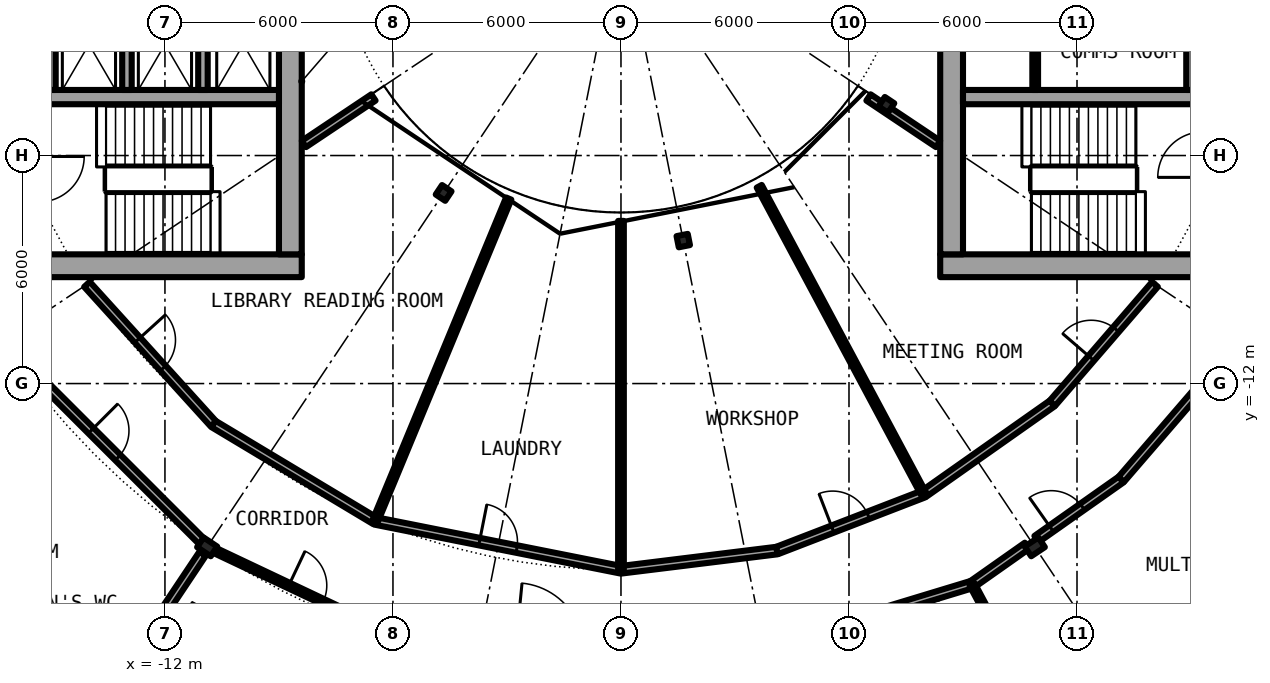
"""IFC4 building model, lengths in metres.
Left out: names, types, materials, properties, quantities, classifications, styles, units other than length and angle.
Written with IfcOpenShell. Run it as: python <this file> out.ifc"""

import sys

from ifc_helpers import new_model, si_unit, direction, frame, frame_2d, origin, origin_2d, place, context, subcontext, project, spatial, rectangle, i_section, extrude, element, fill, save


model = new_model("IFC4")
c1 = context("Model", 3, precision=1e-05, world=origin(), true_north=direction((0.0, 1.0)))
c2 = subcontext(c1, "Body", "Model", "MODEL_VIEW")
j1 = project(units=[si_unit("LENGTHUNIT", "METRE"), si_unit("PLANEANGLEUNIT", "RADIAN")], contexts=[c1])
p1 = place(None, origin())
s1 = spatial("IfcSite", under=j1, at=p1, CompositionType="ELEMENT")
p2 = place(p1, origin())
s2 = spatial("IfcBuilding", under=s1, at=p2, CompositionType="ELEMENT")
p3 = place(p2, frame((0.0, 0.0, 107.45)))
s3 = spatial("IfcBuildingStorey", under=s2, at=p3, CompositionType="ELEMENT", Elevation=107.45)
for number, where, z_axis, x_axis in (
    (1, (-10.889, -16.297, 0.0), (0.0, 0.0, 1.0), (-0.556, -0.831, 0.0)),
    (2, (10.889, -16.297, 0.0), (0.0, 0.0, 1.0), (0.556, -0.831, 0.0)),
):
    element("IfcColumn", number, at=place(p3, frame(where, z_axis=z_axis, x_axis=x_axis)), inside=s3, PredefinedType="COLUMN", context=c2, shape_type="SweptSolid", body=[
        extrude(i_section(OverallWidth=0.307, OverallDepth=0.432, WebThickness=0.021, FlangeThickness=0.04, FilletRadius=0.027, at=origin_2d()), origin(), (0.0, 0.0, 1.0), 4.2),
    ])
for number, where, z_axis, x_axis in (
    (3, (-4.667, -6.984, 0.0), (0.0, 0.0, 1.0), (-0.556, -0.831, 0.0)),
    (4, (1.639, -8.239, 0.0), (0.0, 0.0, 1.0), (0.195, -0.981, 0.0)),
    (5, (6.984, -4.667, 0.0), (0.0, 0.0, 1.0), (0.831, -0.556, 0.0)),
):
    element("IfcColumn", number, at=place(p3, frame(where, z_axis=z_axis, x_axis=x_axis)), inside=s3, PredefinedType="COLUMN", context=c2, shape_type="SweptSolid", body=[
        extrude(i_section(OverallWidth=0.3, OverallDepth=0.3, WebThickness=0.011, FlangeThickness=0.019, FilletRadius=0.027, at=origin_2d()), origin(), (0.0, 0.0, 1.0), 4.2),
    ])
p4 = place(p3, frame((8.4, -8.9, 0.0), z_axis=(0.0, 0.0, 1.0), x_axis=(1.0, 0.0, 0.0)))
e6 = element("IfcWall", 6, at=p4, inside=s3, PredefinedType="SHEAR", context=c2, shape_type="SweptSolid", body=[
    extrude(rectangle(XDim=13.8, YDim=0.6, at=frame_2d((6.9, 0.0))), origin(), (0.0, 0.0, 1.0), 4.2),
])
p5 = place(p4, frame((11.475, 0.0, 0.0)))
e7 = element("IfcOpeningElement", 7, at=p5, cuts=e6, PredefinedType="OPENING", context=c2, shape_type="SweptSolid", body=[
    extrude(rectangle(XDim=1.2, YDim=2.3, at=frame_2d((0.6, 1.15))), frame((0.0, 0.31, 0.0), z_axis=(0.0, -1.0, 0.0), x_axis=(1.0, 0.0, 0.0)), (0.0, 0.0, 1.0), 0.62),
])
p6 = place(p3, frame((8.7, -8.6, 0.0), z_axis=(0.0, 0.0, 1.0), x_axis=(0.0, 1.0, 0.0)))
e8 = element("IfcWall", 8, at=p6, inside=s3, PredefinedType="SHEAR", context=c2, shape_type="SweptSolid", body=[
    extrude(rectangle(XDim=17.2, YDim=0.6, at=frame_2d((8.6, 0.0))), origin(), (0.0, 0.0, 1.0), 4.2),
])
p7 = place(p6, frame((7.4, 0.0, 0.1)))
e9 = element("IfcOpeningElement", 9, at=p7, cuts=e8, PredefinedType="OPENING", context=c2, shape_type="SweptSolid", body=[
    extrude(rectangle(XDim=2.4, YDim=2.2, at=frame_2d((1.2, 1.1))), frame((0.0, 0.31, 0.0), z_axis=(0.0, -1.0, 0.0), x_axis=(1.0, 0.0, 0.0)), (0.0, 0.0, 1.0), 0.62),
])
p8 = place(p3, frame((9.0, -4.462, 0.0), z_axis=(0.0, 0.0, 1.0), x_axis=(1.0, 0.0, 0.0)))
e10 = element("IfcWall", 10, at=p8, inside=s3, PredefinedType="SHEAR", context=c2, shape_type="SweptSolid", body=[
    extrude(rectangle(XDim=10.15, YDim=0.375, at=frame_2d((5.075, 0.0))), origin(), (0.0, 0.0, 1.0), 4.2),
])
p9 = place(p3, frame((15.0, -1.825, 0.0), z_axis=(0.0, 0.0, 1.0), x_axis=(0.0, -1.0, 0.0)))
e11 = element("IfcWall", 11, at=p9, inside=s3, PredefinedType="SOLIDWALL", context=c2, shape_type="SweptSolid", body=[
    extrude(rectangle(XDim=2.45, YDim=0.25, at=frame_2d((1.225, 0.0))), origin(), (0.0, 0.0, 1.0), 3.85),
])
p10 = place(p3, frame((10.9, -1.825, 0.0), z_axis=(0.0, 0.0, 1.0), x_axis=(0.0, -1.0, 0.0)))
e12 = element("IfcWall", 12, at=p10, inside=s3, PredefinedType="PARTITIONING", context=c2, shape_type="SweptSolid", body=[
    extrude(rectangle(XDim=2.45, YDim=0.15, at=frame_2d((1.225, 0.0))), origin(), (0.0, 0.0, 1.0), 3.85),
])
p11 = place(p3, frame((-22.2, -8.9, 0.0), z_axis=(0.0, 0.0, 1.0), x_axis=(1.0, 0.0, 0.0)))
e13 = element("IfcWall", 13, at=p11, inside=s3, PredefinedType="SHEAR", context=c2, shape_type="SweptSolid", body=[
    extrude(rectangle(XDim=13.8, YDim=0.6, at=frame_2d((6.9, 0.0))), origin(), (0.0, 0.0, 1.0), 4.2),
])
p12 = place(p11, frame((1.125, 0.0, 0.0)))
e14 = element("IfcOpeningElement", 14, at=p12, cuts=e13, PredefinedType="OPENING", context=c2, shape_type="SweptSolid", body=[
    extrude(rectangle(XDim=1.2, YDim=2.3, at=frame_2d((0.6, 1.15))), frame((0.0, 0.31, 0.0), z_axis=(0.0, -1.0, 0.0), x_axis=(1.0, 0.0, 0.0)), (0.0, 0.0, 1.0), 0.62),
])
p13 = place(p3, frame((-8.7, 8.6, 0.0), z_axis=(0.0, 0.0, 1.0), x_axis=(0.0, -1.0, 0.0)))
e15 = element("IfcWall", 15, at=p13, inside=s3, PredefinedType="SHEAR", context=c2, shape_type="SweptSolid", body=[
    extrude(rectangle(XDim=17.2, YDim=0.6, at=frame_2d((8.6, 0.0))), origin(), (0.0, 0.0, 1.0), 4.2),
])
p14 = place(p13, frame((7.4, 0.0, 0.1)))
e16 = element("IfcOpeningElement", 16, at=p14, cuts=e15, PredefinedType="OPENING", context=c2, shape_type="SweptSolid", body=[
    extrude(rectangle(XDim=2.4, YDim=2.2, at=frame_2d((1.2, 1.1))), frame((0.0, 0.31, 0.0), z_axis=(0.0, -1.0, 0.0), x_axis=(1.0, 0.0, 0.0)), (0.0, 0.0, 1.0), 0.62),
])
p15 = place(p3, frame((-9.0, -4.462, 0.0), z_axis=(0.0, 0.0, 1.0), x_axis=(-1.0, 0.0, 0.0)))
e17 = element("IfcWall", 17, at=p15, inside=s3, PredefinedType="SHEAR", context=c2, shape_type="SweptSolid", body=[
    extrude(rectangle(XDim=10.15, YDim=0.375, at=frame_2d((5.075, 0.0))), origin(), (0.0, 0.0, 1.0), 4.2),
])
p16 = place(p15, frame((6.6, 0.0, 0.0)))
e18 = element("IfcOpeningElement", 18, at=p16, cuts=e17, PredefinedType="OPENING", context=c2, shape_type="SweptSolid", body=[
    extrude(rectangle(XDim=1.1, YDim=2.3, at=frame_2d((0.55, 1.15))), frame((0.0, 0.198, 0.0), z_axis=(0.0, -1.0, 0.0), x_axis=(1.0, 0.0, 0.0)), (0.0, 0.0, 1.0), 0.395),
])
for number, where, z_axis, x_axis in (
    (19, (-15.0, -1.825, 0.0), (0.0, 0.0, 1.0), (0.0, -1.0, 0.0)),
    (20, (-11.0, -1.825, 0.0), (0.0, 0.0, 1.0), (0.0, -1.0, 0.0)),
    (21, (-13.0, -1.825, 0.0), (0.0, 0.0, 1.0), (0.0, -1.0, 0.0)),
):
    element("IfcWall", number, at=place(p3, frame(where, z_axis=z_axis, x_axis=x_axis)), inside=s3, PredefinedType="SOLIDWALL", context=c2, shape_type="SweptSolid", body=[
        extrude(rectangle(XDim=2.45, YDim=0.25, at=frame_2d((1.225, 0.0))), origin(), (0.0, 0.0, 1.0), 3.85),
    ])
p17 = place(p3, frame((9.239, -17.286, 0.0), z_axis=(0.0, 0.0, 1.0), x_axis=(0.817743843048, 0.575582320052, 0.0)))
e22 = element("IfcWall", 22, at=p17, inside=s3, PredefinedType="PARTITIONING", context=c2, shape_type="SweptSolid", body=[
    extrude(rectangle(XDim=1.768, YDim=0.2, at=frame_2d((0.884, 0.0))), origin(), (0.0, 0.0, 1.0), 3.54),
])
p18 = place(p3, frame((10.936, -16.091, 0.0), z_axis=(0.0, 0.0, 1.0), x_axis=(0.817645456482, 0.575722074872, 0.0)))
e23 = element("IfcWall", 23, at=p18, inside=s3, PredefinedType="PARTITIONING", context=c2, shape_type="SweptSolid", body=[
    extrude(rectangle(XDim=2.724, YDim=0.2, at=frame_2d((1.362, 0.0))), origin(), (0.0, 0.0, 1.0), 3.54),
])
p19 = place(p18, frame((0.474, 0.0, 0.0)))
e24 = element("IfcOpeningElement", 24, at=p19, cuts=e23, PredefinedType="OPENING", context=c2, shape_type="SweptSolid", body=[
    extrude(rectangle(XDim=1.0, YDim=2.3, at=frame_2d((0.5, 1.15))), frame((0.0, 0.11, 0.0), z_axis=(0.0, -1.0, 0.0), x_axis=(1.0, 0.0, 0.0)), (0.0, 0.0, 1.0), 0.22),
])
p20 = place(p3, frame((13.163, -14.523, 0.0), z_axis=(0.0, 0.0, 1.0), x_axis=(0.653087281304, 0.757282644063, 0.0)))
e25 = element("IfcWall", 25, at=p20, inside=s3, PredefinedType="PARTITIONING", context=c2, shape_type="SweptSolid", body=[
    extrude(rectangle(XDim=4.644, YDim=0.2, at=frame_2d((2.322, 0.0))), origin(), (0.0, 0.0, 1.0), 3.54),
])
p21 = place(p3, frame((-10.749, -16.363, 0.0), z_axis=(0.0, 0.0, 1.0), x_axis=(0.903968655954, -0.427598724335, 0.0)))
e26 = element("IfcWall", 26, at=p21, inside=s3, PredefinedType="PARTITIONING", context=c2, shape_type="SweptSolid", body=[
    extrude(rectangle(XDim=5.596, YDim=0.15, at=frame_2d((2.798, 0.0))), origin(), (0.0, 0.0, 1.0), 3.54),
])
p22 = place(p21, frame((2.221, 0.0, 0.0)))
e27 = element("IfcOpeningElement", 27, at=p22, cuts=e26, PredefinedType="OPENING", context=c2, shape_type="SweptSolid", body=[
    extrude(rectangle(XDim=1.0, YDim=2.3, at=frame_2d((0.5, 1.15))), frame((0.0, 0.085, 0.0), z_axis=(0.0, -1.0, 0.0), x_axis=(1.0, 0.0, 0.0)), (0.0, 0.0, 1.0), 0.17),
])
p23 = place(p3, frame((-16.186, -11.0, 0.0), z_axis=(0.0, 0.0, 1.0), x_axis=(0.707106781187, -0.707106781187, 0.0)))
e28 = element("IfcWall", 28, at=p23, inside=s3, PredefinedType="PARTITIONING", context=c2, shape_type="SweptSolid", body=[
    extrude(rectangle(XDim=7.334, YDim=0.2, at=frame_2d((3.667, 0.0))), origin(), (0.0, 0.0, 1.0), 3.54),
])
p24 = place(p23, frame((3.167, 0.0, 0.0)))
e29 = element("IfcOpeningElement", 29, at=p24, cuts=e28, PredefinedType="OPENING", context=c2, shape_type="SweptSolid", body=[
    extrude(rectangle(XDim=1.0, YDim=2.3, at=frame_2d((0.5, 1.15))), frame((0.0, 0.11, 0.0), z_axis=(0.0, -1.0, 0.0), x_axis=(1.0, 0.0, 0.0)), (0.0, 0.0, 1.0), 0.22),
])
p25 = place(p3, frame((1.921, -19.506, 0.0), z_axis=(0.0, 0.0, 1.0), x_axis=(0.956929842753, 0.290319265721, 0.0)))
e30 = element("IfcWall", 30, at=p25, inside=s3, PredefinedType="PARTITIONING", context=c2, shape_type="SweptSolid", body=[
    extrude(rectangle(XDim=7.647, YDim=0.2, at=frame_2d((3.824, 0.0))), origin(), (0.0, 0.0, 1.0), 3.54),
])
p26 = place(p3, frame((0.0, -16.9, 0.0), z_axis=(0.0, 0.0, 1.0), x_axis=(0.992496033272, 0.122276833211, 0.0)))
e31 = element("IfcWall", 31, at=p26, inside=s3, PredefinedType="PARTITIONING", context=c2, shape_type="SweptSolid", body=[
    extrude(rectangle(XDim=4.137, YDim=0.2, at=frame_2d((2.068, 0.0))), origin(), (0.0, 0.0, 1.0), 3.85),
])
p27 = place(p3, frame((4.106, -16.394, 0.0), z_axis=(0.0, 0.0, 1.0), x_axis=(0.932943640288, 0.360022449363, 0.0)))
e32 = element("IfcWall", 32, at=p27, inside=s3, PredefinedType="PARTITIONING", context=c2, shape_type="SweptSolid", body=[
    extrude(rectangle(XDim=4.139, YDim=0.2, at=frame_2d((2.069, 0.0))), origin(), (0.0, 0.0, 1.0), 3.85),
])
p28 = place(p27, frame((1.569, 0.0, 0.0)))
e33 = element("IfcOpeningElement", 33, at=p28, cuts=e32, PredefinedType="OPENING", context=c2, shape_type="SweptSolid", body=[
    extrude(rectangle(XDim=1.0, YDim=2.3, at=frame_2d((0.5, 1.15))), frame((0.0, 0.11, 0.0), z_axis=(0.0, -1.0, 0.0), x_axis=(1.0, 0.0, 0.0)), (0.0, 0.0, 1.0), 0.22),
])
p29 = place(p3, frame((7.967, -14.904, 0.0), z_axis=(0.0, 0.0, 1.0), x_axis=(0.817567680547, 0.575832517079, 0.0)))
e34 = element("IfcWall", 34, at=p29, inside=s3, PredefinedType="PARTITIONING", context=c2, shape_type="SweptSolid", body=[
    extrude(rectangle(XDim=4.137, YDim=0.2, at=frame_2d((2.068, 0.0))), origin(), (0.0, 0.0, 1.0), 3.85),
])
p30 = place(p3, frame((11.349, -12.522, 0.0), z_axis=(0.0, 0.0, 1.0), x_axis=(0.653212695939, 0.757174467256, 0.0)))
e35 = element("IfcWall", 35, at=p30, inside=s3, PredefinedType="PARTITIONING", context=c2, shape_type="SweptSolid", body=[
    extrude(rectangle(XDim=4.138, YDim=0.2, at=frame_2d((2.069, 0.0))), origin(), (0.0, 0.0, 1.0), 3.85),
])
p31 = place(p30, frame((1.569, 0.0, 0.0)))
e36 = element("IfcOpeningElement", 36, at=p31, cuts=e35, PredefinedType="OPENING", context=c2, shape_type="SweptSolid", body=[
    extrude(rectangle(XDim=1.0, YDim=2.3, at=frame_2d((0.5, 1.15))), frame((0.0, 0.11, 0.0), z_axis=(0.0, -1.0, 0.0), x_axis=(1.0, 0.0, 0.0)), (0.0, 0.0, 1.0), 0.22),
])
p32 = place(p3, frame((-14.052, -9.389, 0.0), z_axis=(0.0, 0.0, 1.0), x_axis=(0.671579385786, -0.740932607318, 0.0)))
e37 = element("IfcWall", 37, at=p32, inside=s3, PredefinedType="PARTITIONING", context=c2, shape_type="SweptSolid", body=[
    extrude(rectangle(XDim=4.96, YDim=0.2, at=frame_2d((2.48, 0.0))), origin(), (0.0, 0.0, 1.0), 3.85),
])
p33 = place(p32, frame((1.98, 0.0, 0.0)))
e38 = element("IfcOpeningElement", 38, at=p33, cuts=e37, PredefinedType="OPENING", context=c2, shape_type="SweptSolid", body=[
    extrude(rectangle(XDim=1.0, YDim=2.3, at=frame_2d((0.5, 1.15))), frame((0.0, 0.11, 0.0), z_axis=(0.0, -1.0, 0.0), x_axis=(1.0, 0.0, 0.0)), (0.0, 0.0, 1.0), 0.22),
])
p34 = place(p3, frame((-10.721, -13.064, 0.0), z_axis=(0.0, 0.0, 1.0), x_axis=(0.857696997328, -0.514155483074, 0.0)))
e39 = element("IfcWall", 39, at=p34, inside=s3, PredefinedType="PARTITIONING", context=c2, shape_type="SweptSolid", body=[
    extrude(rectangle(XDim=4.96, YDim=0.2, at=frame_2d((2.48, 0.0))), origin(), (0.0, 0.0, 1.0), 3.85),
])
p35 = place(p3, frame((-6.467, -15.614, 0.0), z_axis=(0.0, 0.0, 1.0), x_axis=(0.980799374359, -0.195019453537, 0.0)))
e40 = element("IfcWall", 40, at=p35, inside=s3, PredefinedType="PARTITIONING", context=c2, shape_type="SweptSolid", body=[
    extrude(rectangle(XDim=6.594, YDim=0.2, at=frame_2d((3.297, 0.0))), origin(), (0.0, 0.0, 1.0), 3.85),
])
p36 = place(p35, frame((2.797, 0.0, 0.0)))
e41 = element("IfcOpeningElement", 41, at=p36, cuts=e40, PredefinedType="OPENING", context=c2, shape_type="SweptSolid", body=[
    extrude(rectangle(XDim=1.0, YDim=2.3, at=frame_2d((0.5, 1.15))), frame((0.0, 0.11, 0.0), z_axis=(0.0, -1.0, 0.0), x_axis=(1.0, 0.0, 0.0)), (0.0, 0.0, 1.0), 0.22),
])
for number, where, z_axis, x_axis in (
    (42, (-6.513, -4.472, 0.0), (0.0, 0.0, 1.0), (-0.831, -0.556, 0.0)),
    (43, (6.513, -4.472, 0.0), (0.0, 0.0, 1.0), (0.831, -0.556, 0.0)),
):
    element("IfcWall", number, at=place(p3, frame(where, z_axis=z_axis, x_axis=x_axis)), inside=s3, PredefinedType="PARTITIONING", context=c2, shape_type="SweptSolid", body=[
        extrude(rectangle(XDim=2.203, YDim=0.2, at=frame_2d((1.101, 0.0))), origin(), (0.0, 0.0, 1.0), 3.85),
    ])
p37 = place(p3, frame((-12.222, -18.292, 0.0), z_axis=(0.0, 0.0, 1.0), x_axis=(0.555628995846, 0.831430345233, 0.0)))
e44 = element("IfcWall", 44, at=p37, inside=s3, PredefinedType="PARTITIONING", context=c2, shape_type="SweptSolid", body=[
    extrude(rectangle(XDim=2.183, YDim=0.2, at=frame_2d((1.091, 0.0))), origin(), (0.0, 0.0, 1.0), 3.85),
])
p38 = place(p3, frame((-6.467, -15.614, 0.0), z_axis=(0.0, 0.0, 1.0), x_axis=(0.382646942224, 0.923894646378, 0.0)))
e45 = element("IfcWall", 45, at=p38, inside=s3, PredefinedType="PARTITIONING", context=c2, shape_type="SweptSolid", body=[
    extrude(rectangle(XDim=9.181, YDim=0.15, at=frame_2d((4.59, 0.0))), origin(), (0.0, 0.0, 1.0), 3.85),
])
p39 = place(p3, frame((0.0, -16.9, 0.0), z_axis=(0.0, 0.0, 1.0), x_axis=(0.0, 1.0, 0.0)))
e46 = element("IfcWall", 46, at=p39, inside=s3, PredefinedType="PARTITIONING", context=c2, shape_type="SweptSolid", body=[
    extrude(rectangle(XDim=9.18, YDim=0.15, at=frame_2d((4.59, 0.0))), origin(), (0.0, 0.0, 1.0), 3.85),
])
p40 = place(p3, frame((3.638, -6.809, 0.0), z_axis=(0.0, 0.0, 1.0), x_axis=(0.471460365694, -0.881887251059, 0.0)))
e47 = element("IfcWall", 47, at=p40, inside=s3, PredefinedType="PARTITIONING", context=c2, shape_type="SweptSolid", body=[
    extrude(rectangle(XDim=9.18, YDim=0.15, at=frame_2d((4.59, 0.0))), origin(), (0.0, 0.0, 1.0), 3.85),
])
p41 = place(p3, frame((9.239, -17.286, 0.0), z_axis=(0.0, 0.0, 1.0), x_axis=(0.471439510802, -0.881898399848, 0.0)))
e48 = element("IfcWall", 48, at=p41, inside=s3, PredefinedType="PARTITIONING", context=c2, shape_type="SweptSolid", body=[
    extrude(rectangle(XDim=7.575, YDim=0.15, at=frame_2d((3.787, 0.0))), origin(), (0.0, 0.0, 1.0), 3.85),
])
p42 = place(p22, origin())
e49 = element("IfcDoor", 49, at=p42, inside=s3, OperationType="SINGLE_SWING_LEFT", PredefinedType="DOOR", context=c2, shape_type="SweptSolid", body=[
    extrude(rectangle(XDim=1.0, YDim=2.3, at=frame_2d((0.5, 1.15))), frame((0.0, 0.025, 0.0), z_axis=(0.0, -1.0, 0.0), x_axis=(1.0, 0.0, 0.0)), (0.0, 0.0, 1.0), 0.05),
])
fill(e27, e49)
p43 = place(p24, origin())
e50 = element("IfcDoor", 50, at=p43, inside=s3, OperationType="SINGLE_SWING_LEFT", PredefinedType="DOOR", context=c2, shape_type="SweptSolid", body=[
    extrude(rectangle(XDim=1.0, YDim=2.3, at=frame_2d((0.5, 1.15))), frame((0.0, 0.025, 0.0), z_axis=(0.0, -1.0, 0.0), x_axis=(1.0, 0.0, 0.0)), (0.0, 0.0, 1.0), 0.05),
])
fill(e29, e50)
p44 = place(p19, origin())
e51 = element("IfcDoor", 51, at=p44, inside=s3, OperationType="SINGLE_SWING_LEFT", PredefinedType="DOOR", context=c2, shape_type="SweptSolid", body=[
    extrude(rectangle(XDim=1.0, YDim=2.3, at=frame_2d((0.5, 1.15))), frame((0.0, 0.025, 0.0), z_axis=(0.0, -1.0, 0.0), x_axis=(1.0, 0.0, 0.0)), (0.0, 0.0, 1.0), 0.05),
])
fill(e24, e51)
p45 = place(p33, origin())
e52 = element("IfcDoor", 52, at=p45, inside=s3, OperationType="SINGLE_SWING_LEFT", PredefinedType="DOOR", context=c2, shape_type="SweptSolid", body=[
    extrude(rectangle(XDim=1.0, YDim=2.3, at=frame_2d((0.5, 1.15))), frame((0.0, 0.025, 0.0), z_axis=(0.0, -1.0, 0.0), x_axis=(1.0, 0.0, 0.0)), (0.0, 0.0, 1.0), 0.05),
])
fill(e38, e52)
p46 = place(p36, origin())
e53 = element("IfcDoor", 53, at=p46, inside=s3, OperationType="SINGLE_SWING_LEFT", PredefinedType="DOOR", context=c2, shape_type="SweptSolid", body=[
    extrude(rectangle(XDim=1.0, YDim=2.3, at=frame_2d((0.5, 1.15))), frame((0.0, 0.025, 0.0), z_axis=(0.0, -1.0, 0.0), x_axis=(1.0, 0.0, 0.0)), (0.0, 0.0, 1.0), 0.05),
])
fill(e41, e53)
p47 = place(p28, origin())
e54 = element("IfcDoor", 54, at=p47, inside=s3, OperationType="SINGLE_SWING_RIGHT", PredefinedType="DOOR", context=c2, shape_type="SweptSolid", body=[
    extrude(rectangle(XDim=1.0, YDim=2.3, at=frame_2d((0.5, 1.15))), frame((0.0, 0.025, 0.0), z_axis=(0.0, -1.0, 0.0), x_axis=(1.0, 0.0, 0.0)), (0.0, 0.0, 1.0), 0.05),
])
fill(e33, e54)
p48 = place(p31, origin())
e55 = element("IfcDoor", 55, at=p48, inside=s3, OperationType="SINGLE_SWING_RIGHT", PredefinedType="DOOR", context=c2, shape_type="SweptSolid", body=[
    extrude(rectangle(XDim=1.0, YDim=2.3, at=frame_2d((0.5, 1.15))), frame((0.0, 0.025, 0.0), z_axis=(0.0, -1.0, 0.0), x_axis=(1.0, 0.0, 0.0)), (0.0, 0.0, 1.0), 0.05),
])
fill(e36, e55)
save(model, sys.argv[1])
